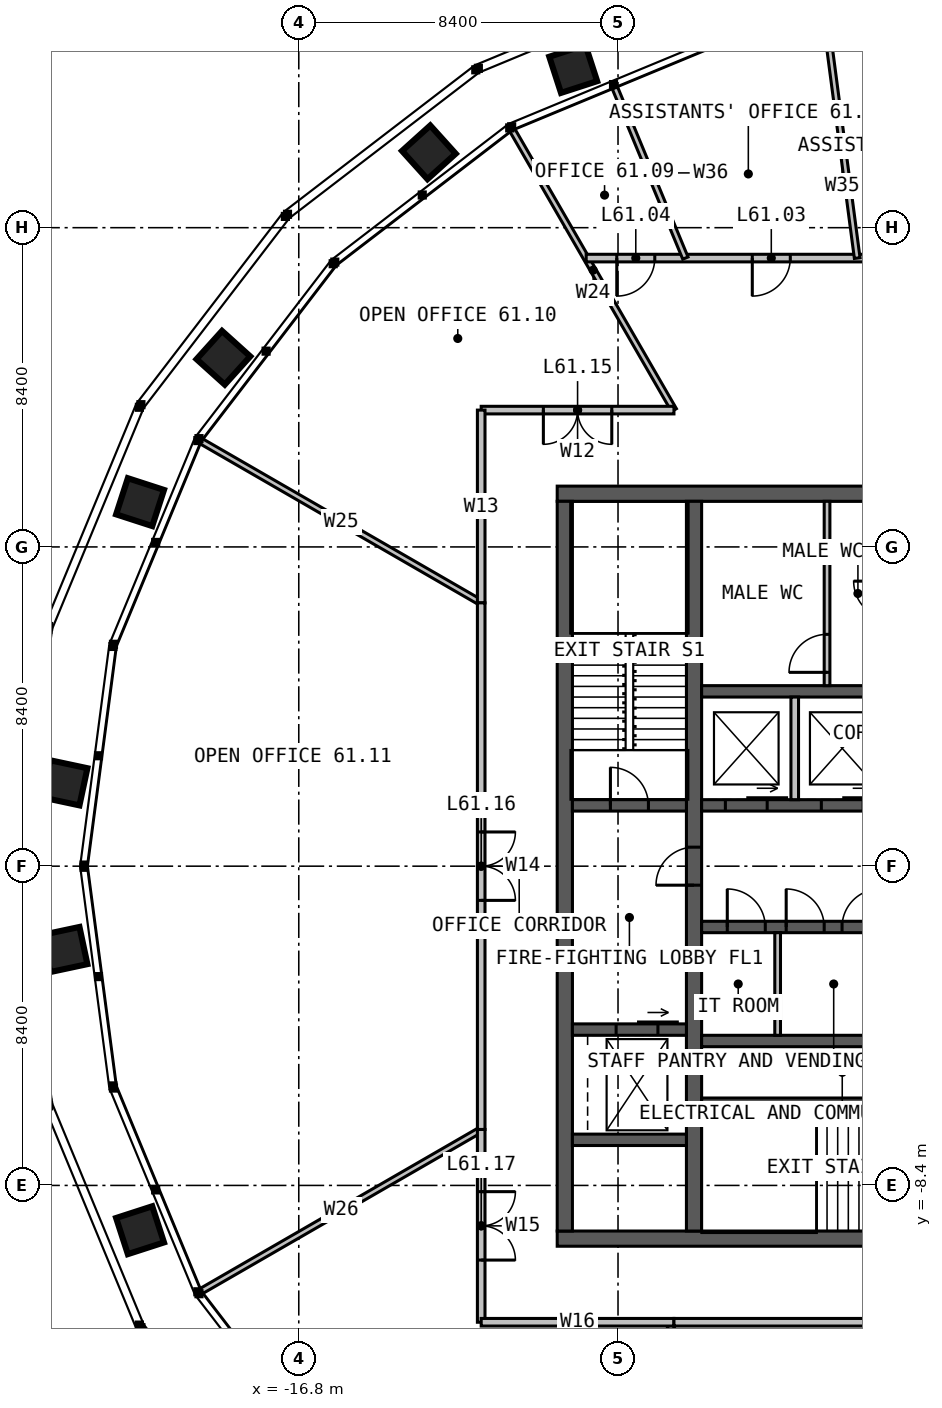
"""IFC4 building model, lengths in metres.
Left out: names, types, materials, properties, quantities, classifications, styles, units other than length and angle.
Written with IfcOpenShell. Run it as: python <this file> out.ifc"""

import sys

from ifc_helpers import new_model, si_unit, direction, frame, frame_2d, origin, place, context, subcontext, project, spatial, rectangle, extrude, element, fill, save


model = new_model("IFC4")
c1 = context("Model", 3, precision=1e-05, world=origin(), true_north=direction((0.0, 1.0)))
c2 = subcontext(c1, "Body", "Model", "MODEL_VIEW")
j1 = project(units=[si_unit("LENGTHUNIT", "METRE"), si_unit("PLANEANGLEUNIT", "RADIAN")], contexts=[c1])
p1 = place(None, origin())
s1 = spatial("IfcSite", under=j1, at=p1, CompositionType="ELEMENT")
p2 = place(p1, origin())
s2 = spatial("IfcBuilding", under=s1, at=p2, CompositionType="ELEMENT")
p3 = place(p2, frame((0.0, 0.0, 252.0)))
s3 = spatial("IfcBuildingStorey", under=s2, at=p3, CompositionType="ELEMENT", Elevation=252.0)
p4 = place(p3, frame((-10.0, 9.8, 0.0), z_axis=(0.0, 0.0, 1.0), x_axis=(1.0, 0.0, 0.0)))
e1 = element("IfcWall", 1, at=p4, inside=s3, PredefinedType="SOLIDWALL", context=c2, shape_type="SweptSolid", body=[
    extrude(rectangle(XDim=20.0, YDim=0.4, at=frame_2d((10.0, 0.0))), origin(), (0.0, 0.0, 1.0), 4.0),
])
p5 = place(p4, frame((9.4, 0.0, 0.0)))
e2 = element("IfcOpeningElement", 2, at=p5, cuts=e1, PredefinedType="OPENING", context=c2, shape_type="SweptSolid", body=[
    extrude(rectangle(XDim=1.2, YDim=2.2, at=frame_2d((0.6, 1.1))), frame((0.0, 0.21, 0.0), z_axis=(0.0, -1.0, 0.0), x_axis=(1.0, 0.0, 0.0)), (0.0, 0.0, 1.0), 0.42),
])
p6 = place(p3, frame((10.0, -9.8, 0.0), z_axis=(0.0, 0.0, 1.0), x_axis=(-1.0, 0.0, 0.0)))
e3 = element("IfcWall", 3, at=p6, inside=s3, PredefinedType="SOLIDWALL", context=c2, shape_type="SweptSolid", body=[
    extrude(rectangle(XDim=20.0, YDim=0.4, at=frame_2d((10.0, 0.0))), origin(), (0.0, 0.0, 1.0), 4.0),
])
p7 = place(p6, frame((6.875, 0.0, 0.0)))
e4 = element("IfcOpeningElement", 4, at=p7, cuts=e3, PredefinedType="OPENING", context=c2, shape_type="SweptSolid", body=[
    extrude(rectangle(XDim=1.2, YDim=2.2, at=frame_2d((0.6, 1.1))), frame((0.0, 0.21, 0.0), z_axis=(0.0, -1.0, 0.0), x_axis=(1.0, 0.0, 0.0)), (0.0, 0.0, 1.0), 0.42),
])
p8 = place(p3, frame((-9.8, 9.6, 0.0), z_axis=(0.0, 0.0, 1.0), x_axis=(0.0, -1.0, 0.0)))
e5 = element("IfcWall", 5, at=p8, inside=s3, PredefinedType="SOLIDWALL", context=c2, shape_type="SweptSolid", body=[
    extrude(rectangle(XDim=19.2, YDim=0.4, at=frame_2d((9.6, 0.0))), origin(), (0.0, 0.0, 1.0), 4.0),
])
p9 = place(p3, frame((-6.4, -9.6, 0.0), z_axis=(0.0, 0.0, 1.0), x_axis=(0.0, 1.0, 0.0)))
e6 = element("IfcWall", 6, at=p9, inside=s3, PredefinedType="SOLIDWALL", context=c2, shape_type="SweptSolid", body=[
    extrude(rectangle(XDim=19.2, YDim=0.4, at=frame_2d((9.6, 0.0))), origin(), (0.0, 0.0, 1.0), 4.0),
])
p10 = place(p9, frame((9.1, 0.0, 0.0)))
e7 = element("IfcOpeningElement", 7, at=p10, cuts=e6, PredefinedType="OPENING", context=c2, shape_type="SweptSolid", body=[
    extrude(rectangle(XDim=1.0, YDim=2.2, at=frame_2d((0.5, 1.1))), frame((0.0, 0.21, 0.0), z_axis=(0.0, -1.0, 0.0), x_axis=(1.0, 0.0, 0.0)), (0.0, 0.0, 1.0), 0.42),
])
p11 = place(p3, frame((-6.2, 1.6, 0.0), z_axis=(0.0, 0.0, 1.0), x_axis=(1.0, 0.0, 0.0)))
e8 = element("IfcWall", 8, at=p11, inside=s3, PredefinedType="SOLIDWALL", context=c2, shape_type="SweptSolid", body=[
    extrude(rectangle(XDim=4.85, YDim=0.3, at=frame_2d((2.425, 0.0))), origin(), (0.0, 0.0, 1.0), 4.0),
])
p12 = place(p11, frame((0.625, 0.0, 0.0)))
e9 = element("IfcOpeningElement", 9, at=p12, cuts=e8, PredefinedType="OPENING", context=c2, shape_type="SweptSolid", body=[
    extrude(rectangle(XDim=1.1, YDim=2.2, at=frame_2d((0.55, 1.1))), frame((0.0, 0.16, 0.0), z_axis=(0.0, -1.0, 0.0), x_axis=(1.0, 0.0, 0.0)), (0.0, 0.0, 1.0), 0.32),
])
p13 = place(p11, frame((3.15, 0.0, 0.0)))
e10 = element("IfcOpeningElement", 10, at=p13, cuts=e8, PredefinedType="OPENING", context=c2, shape_type="SweptSolid", body=[
    extrude(rectangle(XDim=1.1, YDim=2.2, at=frame_2d((0.55, 1.1))), frame((0.0, 0.16, 0.0), z_axis=(0.0, -1.0, 0.0), x_axis=(1.0, 0.0, 0.0)), (0.0, 0.0, 1.0), 0.32),
])
p14 = place(p3, frame((-6.2, 4.6, 0.0), z_axis=(0.0, 0.0, 1.0), x_axis=(1.0, 0.0, 0.0)))
e11 = element("IfcWall", 11, at=p14, inside=s3, PredefinedType="SOLIDWALL", context=c2, shape_type="SweptSolid", body=[
    extrude(rectangle(XDim=4.85, YDim=0.3, at=frame_2d((2.425, 0.0))), origin(), (0.0, 0.0, 1.0), 4.0),
])
p15 = place(p3, frame((-6.2, -1.6, 0.0), z_axis=(0.0, 0.0, 1.0), x_axis=(1.0, 0.0, 0.0)))
e12 = element("IfcWall", 12, at=p15, inside=s3, PredefinedType="SOLIDWALL", context=c2, shape_type="SweptSolid", body=[
    extrude(rectangle(XDim=7.4, YDim=0.3, at=frame_2d((3.7, 0.0))), origin(), (0.0, 0.0, 1.0), 4.0),
])
p16 = place(p15, frame((0.675, 0.0, 0.0)))
e13 = element("IfcOpeningElement", 13, at=p16, cuts=e12, PredefinedType="OPENING", context=c2, shape_type="SweptSolid", body=[
    extrude(rectangle(XDim=1.0, YDim=2.2, at=frame_2d((0.5, 1.1))), frame((0.0, 0.16, 0.0), z_axis=(0.0, -1.0, 0.0), x_axis=(1.0, 0.0, 0.0)), (0.0, 0.0, 1.0), 0.32),
])
p17 = place(p15, frame((2.225, 0.0, 0.0)))
e14 = element("IfcOpeningElement", 14, at=p17, cuts=e12, PredefinedType="OPENING", context=c2, shape_type="SweptSolid", body=[
    extrude(rectangle(XDim=1.0, YDim=2.2, at=frame_2d((0.5, 1.1))), frame((0.0, 0.16, 0.0), z_axis=(0.0, -1.0, 0.0), x_axis=(1.0, 0.0, 0.0)), (0.0, 0.0, 1.0), 0.32),
])
p18 = place(p15, frame((3.695, 0.0, 0.0)))
e15 = element("IfcOpeningElement", 15, at=p18, cuts=e12, PredefinedType="OPENING", context=c2, shape_type="SweptSolid", body=[
    extrude(rectangle(XDim=1.0, YDim=2.2, at=frame_2d((0.5, 1.1))), frame((0.0, 0.16, 0.0), z_axis=(0.0, -1.0, 0.0), x_axis=(1.0, 0.0, 0.0)), (0.0, 0.0, 1.0), 0.32),
])
p19 = place(p3, frame((-6.2, -4.6, 0.0), z_axis=(0.0, 0.0, 1.0), x_axis=(1.0, 0.0, 0.0)))
e16 = element("IfcWall", 16, at=p19, inside=s3, PredefinedType="SOLIDWALL", context=c2, shape_type="SweptSolid", body=[
    extrude(rectangle(XDim=7.4, YDim=0.3, at=frame_2d((3.7, 0.0))), origin(), (0.0, 0.0, 1.0), 4.0),
])
p20 = place(p3, frame((-6.2, -6.2, 0.0), z_axis=(0.0, 0.0, 1.0), x_axis=(1.0, 0.0, 0.0)))
e17 = element("IfcWall", 17, at=p20, inside=s3, PredefinedType="SOLIDWALL", context=c2, shape_type="SweptSolid", body=[
    extrude(rectangle(XDim=7.4, YDim=0.2, at=frame_2d((3.7, 0.0))), origin(), (0.0, 0.0, 1.0), 4.0),
])
p21 = place(p3, frame((-9.6, 1.6, 0.0), z_axis=(0.0, 0.0, 1.0), x_axis=(1.0, 0.0, 0.0)))
e18 = element("IfcWall", 18, at=p21, inside=s3, PredefinedType="SOLIDWALL", context=c2, shape_type="SweptSolid", body=[
    extrude(rectangle(XDim=3.0, YDim=0.3, at=frame_2d((1.5, 0.0))), origin(), (0.0, 0.0, 1.0), 4.0),
])
p22 = place(p21, frame((1.0, 0.0, 0.0)))
e19 = element("IfcOpeningElement", 19, at=p22, cuts=e18, PredefinedType="OPENING", context=c2, shape_type="SweptSolid", body=[
    extrude(rectangle(XDim=1.0, YDim=2.2, at=frame_2d((0.5, 1.1))), frame((0.0, 0.16, 0.0), z_axis=(0.0, -1.0, 0.0), x_axis=(1.0, 0.0, 0.0)), (0.0, 0.0, 1.0), 0.32),
])
p23 = place(p3, frame((-9.6, -4.3, 0.0), z_axis=(0.0, 0.0, 1.0), x_axis=(1.0, 0.0, 0.0)))
e20 = element("IfcWall", 20, at=p23, inside=s3, PredefinedType="SOLIDWALL", context=c2, shape_type="SweptSolid", body=[
    extrude(rectangle(XDim=3.0, YDim=0.3, at=frame_2d((1.5, 0.0))), origin(), (0.0, 0.0, 1.0), 4.0),
])
p24 = place(p23, frame((1.15, 0.0, 0.0)))
e21 = element("IfcOpeningElement", 21, at=p24, cuts=e20, PredefinedType="OPENING", context=c2, shape_type="SweptSolid", body=[
    extrude(rectangle(XDim=1.1, YDim=2.2, at=frame_2d((0.55, 1.1))), frame((0.0, 0.16, 0.0), z_axis=(0.0, -1.0, 0.0), x_axis=(1.0, 0.0, 0.0)), (0.0, 0.0, 1.0), 0.32),
])
p25 = place(p3, frame((-9.6, -7.2, 0.0), z_axis=(0.0, 0.0, 1.0), x_axis=(1.0, 0.0, 0.0)))
e22 = element("IfcWall", 22, at=p25, inside=s3, PredefinedType="SOLIDWALL", context=c2, shape_type="SweptSolid", body=[
    extrude(rectangle(XDim=3.0, YDim=0.3, at=frame_2d((1.5, 0.0))), origin(), (0.0, 0.0, 1.0), 4.0),
])
p26 = place(p3, frame((-3.75, 1.75, 0.0), z_axis=(0.0, 0.0, 1.0), x_axis=(0.0, 1.0, 0.0)))
e23 = element("IfcWall", 23, at=p26, inside=s3, PredefinedType="SOLIDWALL", context=c2, shape_type="SweptSolid", body=[
    extrude(rectangle(XDim=2.7, YDim=0.2, at=frame_2d((1.35, 0.0))), origin(), (0.0, 0.0, 1.0), 3.75),
])
p27 = place(p3, frame((-2.9, 4.75, 0.0), z_axis=(0.0, 0.0, 1.0), x_axis=(0.0, 1.0, 0.0)))
e24 = element("IfcWall", 24, at=p27, inside=s3, PredefinedType="PARTITIONING", context=c2, shape_type="SweptSolid", body=[
    extrude(rectangle(XDim=4.85, YDim=0.15, at=frame_2d((2.425, 0.0))), origin(), (0.0, 0.0, 1.0), 3.75),
])
p28 = place(p27, frame((0.35, 0.0, 0.0)))
e25 = element("IfcOpeningElement", 25, at=p28, cuts=e24, PredefinedType="OPENING", context=c2, shape_type="SweptSolid", body=[
    extrude(rectangle(XDim=1.0, YDim=2.2, at=frame_2d((0.5, 1.1))), frame((0.0, 0.085, 0.0), z_axis=(0.0, -1.0, 0.0), x_axis=(1.0, 0.0, 0.0)), (0.0, 0.0, 1.0), 0.17),
])
p29 = place(p3, frame((-4.2, -1.75, 0.0), z_axis=(0.0, 0.0, 1.0), x_axis=(0.0, -1.0, 0.0)))
e26 = element("IfcWall", 26, at=p29, inside=s3, PredefinedType="PARTITIONING", context=c2, shape_type="SweptSolid", body=[
    extrude(rectangle(XDim=2.7, YDim=0.15, at=frame_2d((1.35, 0.0))), origin(), (0.0, 0.0, 1.0), 3.75),
])
for number, where, z_axis, x_axis in (
    (27, (-6.928, 12.0, 0.0), (0.0, 0.0, 1.0), (-0.5, 0.866, 0.0)),
    (28, (-12.0, 6.928, 0.0), (0.0, 0.0, 1.0), (-0.866, 0.5, 0.0)),
    (29, (-12.0, -6.928, 0.0), (0.0, 0.0, 1.0), (-0.866, -0.5, 0.0)),
    (30, (-6.928, -12.0, 0.0), (0.0, 0.0, 1.0), (-0.5, -0.866, 0.0)),
):
    element("IfcWall", number, at=place(p3, frame(where, z_axis=z_axis, x_axis=x_axis)), inside=s3, PredefinedType="PARTITIONING", context=c2, shape_type="SweptSolid", body=[
        extrude(rectangle(XDim=8.505, YDim=0.15, at=frame_2d((4.252, 0.0))), origin(), (0.0, 0.0, 1.0), 2.79),
    ])
p30 = place(p3, frame((9.238, 16.0, 0.0), z_axis=(0.0, 0.0, 1.0), x_axis=(-1.0, 0.0, 0.0)))
e31 = element("IfcWall", 31, at=p30, inside=s3, PredefinedType="PARTITIONING", context=c2, shape_type="SweptSolid", body=[
    extrude(rectangle(XDim=18.475, YDim=0.2, at=frame_2d((9.238, 0.0))), origin(), (0.0, 0.0, 1.0), 3.8),
])
p31 = place(p30, frame((3.066, 0.0, 0.0)))
e32 = element("IfcOpeningElement", 32, at=p31, cuts=e31, PredefinedType="OPENING", context=c2, shape_type="SweptSolid", body=[
    extrude(rectangle(XDim=1.0, YDim=2.2, at=frame_2d((0.5, 1.1))), frame((0.0, 0.11, 0.0), z_axis=(0.0, -1.0, 0.0), x_axis=(1.0, 0.0, 0.0)), (0.0, 0.0, 1.0), 0.22),
])
p32 = place(p30, frame((8.738, 0.0, 0.0)))
e33 = element("IfcOpeningElement", 33, at=p32, cuts=e31, PredefinedType="OPENING", context=c2, shape_type="SweptSolid", body=[
    extrude(rectangle(XDim=1.0, YDim=2.2, at=frame_2d((0.5, 1.1))), frame((0.0, 0.11, 0.0), z_axis=(0.0, -1.0, 0.0), x_axis=(1.0, 0.0, 0.0)), (0.0, 0.0, 1.0), 0.22),
])
p33 = place(p30, frame((13.104, 0.0, 0.0)))
e34 = element("IfcOpeningElement", 34, at=p33, cuts=e31, PredefinedType="OPENING", context=c2, shape_type="SweptSolid", body=[
    extrude(rectangle(XDim=1.0, YDim=2.2, at=frame_2d((0.5, 1.1))), frame((0.0, 0.11, 0.0), z_axis=(0.0, -1.0, 0.0), x_axis=(1.0, 0.0, 0.0)), (0.0, 0.0, 1.0), 0.22),
])
p34 = place(p30, frame((16.67, 0.0, 0.0)))
e35 = element("IfcOpeningElement", 35, at=p34, cuts=e31, PredefinedType="OPENING", context=c2, shape_type="SweptSolid", body=[
    extrude(rectangle(XDim=1.0, YDim=2.2, at=frame_2d((0.5, 1.1))), frame((0.0, 0.11, 0.0), z_axis=(0.0, -1.0, 0.0), x_axis=(1.0, 0.0, 0.0)), (0.0, 0.0, 1.0), 0.22),
])
p35 = place(p3, frame((-2.106, 16.0, 0.0), z_axis=(0.0, 0.0, 1.0), x_axis=(-0.130533038219, 0.991443960057, 0.0)))
e36 = element("IfcWall", 36, at=p35, inside=s3, PredefinedType="PARTITIONING", context=c2, shape_type="SweptSolid", body=[
    extrude(rectangle(XDim=6.032, YDim=0.15, at=frame_2d((3.016, 0.0))), origin(), (0.0, 0.0, 1.0), 2.79),
])
p36 = place(p3, frame((-6.627, 16.0, 0.0), z_axis=(0.0, 0.0, 1.0), x_axis=(-0.38268510723, 0.923878838758, 0.0)))
e37 = element("IfcWall", 37, at=p36, inside=s3, PredefinedType="PARTITIONING", context=c2, shape_type="SweptSolid", body=[
    extrude(rectangle(XDim=4.852, YDim=0.15, at=frame_2d((2.426, 0.0))), origin(), (0.0, 0.0, 1.0), 2.79),
])
p37 = place(p3, frame((-6.928, 12.0, 0.0), z_axis=(0.0, 0.0, 1.0), x_axis=(-1.0, 0.0, 0.0)))
e38 = element("IfcWall", 38, at=p37, inside=s3, PredefinedType="PARTITIONING", context=c2, shape_type="SweptSolid", body=[
    extrude(rectangle(XDim=5.072, YDim=0.2, at=frame_2d((2.536, 0.0))), origin(), (0.0, 0.0, 1.0), 3.8),
])
p38 = place(p37, frame((1.636, 0.0, 0.0)))
e39 = element("IfcOpeningElement", 39, at=p38, cuts=e38, PredefinedType="OPENING", context=c2, shape_type="SweptSolid", body=[
    extrude(rectangle(XDim=1.8, YDim=2.2, at=frame_2d((0.9, 1.1))), frame((0.0, 0.11, 0.0), z_axis=(0.0, -1.0, 0.0), x_axis=(1.0, 0.0, 0.0)), (0.0, 0.0, 1.0), 0.22),
])
p39 = place(p3, frame((-12.0, 12.0, 0.0), z_axis=(0.0, 0.0, 1.0), x_axis=(0.0, -1.0, 0.0)))
e40 = element("IfcWall", 40, at=p39, inside=s3, PredefinedType="PARTITIONING", context=c2, shape_type="SweptSolid", body=[
    extrude(rectangle(XDim=5.072, YDim=0.2, at=frame_2d((2.536, 0.0))), origin(), (0.0, 0.0, 1.0), 3.8),
])
p40 = place(p3, frame((-12.0, 6.928, 0.0), z_axis=(0.0, 0.0, 1.0), x_axis=(0.0, -1.0, 0.0)))
e41 = element("IfcWall", 41, at=p40, inside=s3, PredefinedType="PARTITIONING", context=c2, shape_type="SweptSolid", body=[
    extrude(rectangle(XDim=13.856, YDim=0.2, at=frame_2d((6.928, 0.0))), origin(), (0.0, 0.0, 1.0), 3.8),
])
p41 = place(p40, frame((6.028, 0.0, 0.0)))
e42 = element("IfcOpeningElement", 42, at=p41, cuts=e41, PredefinedType="OPENING", context=c2, shape_type="SweptSolid", body=[
    extrude(rectangle(XDim=1.8, YDim=2.2, at=frame_2d((0.9, 1.1))), frame((0.0, 0.11, 0.0), z_axis=(0.0, -1.0, 0.0), x_axis=(1.0, 0.0, 0.0)), (0.0, 0.0, 1.0), 0.22),
])
p42 = place(p3, frame((-12.0, -6.928, 0.0), z_axis=(0.0, 0.0, 1.0), x_axis=(0.0, -1.0, 0.0)))
e43 = element("IfcWall", 43, at=p42, inside=s3, PredefinedType="PARTITIONING", context=c2, shape_type="SweptSolid", body=[
    extrude(rectangle(XDim=5.072, YDim=0.2, at=frame_2d((2.536, 0.0))), origin(), (0.0, 0.0, 1.0), 3.8),
])
p43 = place(p42, frame((1.636, 0.0, 0.0)))
e44 = element("IfcOpeningElement", 44, at=p43, cuts=e43, PredefinedType="OPENING", context=c2, shape_type="SweptSolid", body=[
    extrude(rectangle(XDim=1.8, YDim=2.2, at=frame_2d((0.9, 1.1))), frame((0.0, 0.11, 0.0), z_axis=(0.0, -1.0, 0.0), x_axis=(1.0, 0.0, 0.0)), (0.0, 0.0, 1.0), 0.22),
])
p44 = place(p3, frame((-12.0, -12.0, 0.0), z_axis=(0.0, 0.0, 1.0), x_axis=(1.0, 0.0, 0.0)))
e45 = element("IfcWall", 45, at=p44, inside=s3, PredefinedType="PARTITIONING", context=c2, shape_type="SweptSolid", body=[
    extrude(rectangle(XDim=5.072, YDim=0.2, at=frame_2d((2.536, 0.0))), origin(), (0.0, 0.0, 1.0), 3.8),
])
p45 = place(p3, frame((-6.928, -12.0, 0.0), z_axis=(0.0, 0.0, 1.0), x_axis=(1.0, 0.0, 0.0)))
e46 = element("IfcWall", 46, at=p45, inside=s3, PredefinedType="PARTITIONING", context=c2, shape_type="SweptSolid", body=[
    extrude(rectangle(XDim=13.856, YDim=0.2, at=frame_2d((6.928, 0.0))), origin(), (0.0, 0.0, 1.0), 3.8),
])
p46 = place(p45, frame((6.028, 0.0, 0.0)))
e47 = element("IfcOpeningElement", 47, at=p46, cuts=e46, PredefinedType="OPENING", context=c2, shape_type="SweptSolid", body=[
    extrude(rectangle(XDim=1.8, YDim=2.2, at=frame_2d((0.9, 1.1))), frame((0.0, 0.11, 0.0), z_axis=(0.0, -1.0, 0.0), x_axis=(1.0, 0.0, 0.0)), (0.0, 0.0, 1.0), 0.22),
])
p47 = place(p10, origin())
e48 = element("IfcDoor", 48, at=p47, inside=s3, OperationType="SINGLE_SWING_LEFT", PredefinedType="DOOR", context=c2, shape_type="SweptSolid", body=[
    extrude(rectangle(XDim=1.0, YDim=2.2, at=frame_2d((0.5, 1.1))), frame((0.0, 0.025, 0.0), z_axis=(0.0, -1.0, 0.0), x_axis=(1.0, 0.0, 0.0)), (0.0, 0.0, 1.0), 0.05),
])
fill(e7, e48)
p48 = place(p22, origin())
e49 = element("IfcDoor", 49, at=p48, inside=s3, OperationType="SINGLE_SWING_LEFT", PredefinedType="DOOR", context=c2, shape_type="SweptSolid", body=[
    extrude(rectangle(XDim=1.0, YDim=2.2, at=frame_2d((0.5, 1.1))), frame((0.0, 0.025, 0.0), z_axis=(0.0, -1.0, 0.0), x_axis=(1.0, 0.0, 0.0)), (0.0, 0.0, 1.0), 0.05),
])
fill(e19, e49)
p49 = place(p28, origin())
e50 = element("IfcDoor", 50, at=p49, inside=s3, OperationType="SINGLE_SWING_LEFT", PredefinedType="DOOR", context=c2, shape_type="SweptSolid", body=[
    extrude(rectangle(XDim=1.0, YDim=2.2, at=frame_2d((0.5, 1.1))), frame((0.0, 0.025, 0.0), z_axis=(0.0, -1.0, 0.0), x_axis=(1.0, 0.0, 0.0)), (0.0, 0.0, 1.0), 0.05),
])
fill(e25, e50)
p50 = place(p16, origin())
e51 = element("IfcDoor", 51, at=p50, inside=s3, OperationType="SINGLE_SWING_LEFT", PredefinedType="DOOR", context=c2, shape_type="SweptSolid", body=[
    extrude(rectangle(XDim=1.0, YDim=2.2, at=frame_2d((0.5, 1.1))), frame((0.0, 0.025, 0.0), z_axis=(0.0, -1.0, 0.0), x_axis=(1.0, 0.0, 0.0)), (0.0, 0.0, 1.0), 0.05),
])
fill(e13, e51)
p51 = place(p17, origin())
e52 = element("IfcDoor", 52, at=p51, inside=s3, OperationType="SINGLE_SWING_LEFT", PredefinedType="DOOR", context=c2, shape_type="SweptSolid", body=[
    extrude(rectangle(XDim=1.0, YDim=2.2, at=frame_2d((0.5, 1.1))), frame((0.0, 0.025, 0.0), z_axis=(0.0, -1.0, 0.0), x_axis=(1.0, 0.0, 0.0)), (0.0, 0.0, 1.0), 0.05),
])
fill(e14, e52)
p52 = place(p18, origin())
e53 = element("IfcDoor", 53, at=p52, inside=s3, OperationType="SINGLE_SWING_RIGHT", PredefinedType="DOOR", context=c2, shape_type="SweptSolid", body=[
    extrude(rectangle(XDim=1.0, YDim=2.2, at=frame_2d((0.5, 1.1))), frame((0.0, 0.025, 0.0), z_axis=(0.0, -1.0, 0.0), x_axis=(1.0, 0.0, 0.0)), (0.0, 0.0, 1.0), 0.05),
])
fill(e15, e53)
p53 = place(p12, origin())
e54 = element("IfcDoor", 54, at=p53, inside=s3, OperationType="SLIDING_TO_LEFT", PredefinedType="DOOR", context=c2, shape_type="SweptSolid", body=[
    extrude(rectangle(XDim=1.1, YDim=2.2, at=frame_2d((0.55, 1.1))), frame((0.0, 0.025, 0.0), z_axis=(0.0, -1.0, 0.0), x_axis=(1.0, 0.0, 0.0)), (0.0, 0.0, 1.0), 0.05),
])
fill(e9, e54)
p54 = place(p13, origin())
e55 = element("IfcDoor", 55, at=p54, inside=s3, OperationType="SLIDING_TO_LEFT", PredefinedType="DOOR", context=c2, shape_type="SweptSolid", body=[
    extrude(rectangle(XDim=1.1, YDim=2.2, at=frame_2d((0.55, 1.1))), frame((0.0, 0.025, 0.0), z_axis=(0.0, -1.0, 0.0), x_axis=(1.0, 0.0, 0.0)), (0.0, 0.0, 1.0), 0.05),
])
fill(e10, e55)
p55 = place(p24, origin())
e56 = element("IfcDoor", 56, at=p55, inside=s3, OperationType="SLIDING_TO_LEFT", PredefinedType="DOOR", context=c2, shape_type="SweptSolid", body=[
    extrude(rectangle(XDim=1.1, YDim=2.2, at=frame_2d((0.55, 1.1))), frame((0.0, 0.025, 0.0), z_axis=(0.0, -1.0, 0.0), x_axis=(1.0, 0.0, 0.0)), (0.0, 0.0, 1.0), 0.05),
])
fill(e21, e56)
p56 = place(p33, origin())
e57 = element("IfcDoor", 57, at=p56, inside=s3, OperationType="SINGLE_SWING_RIGHT", PredefinedType="DOOR", context=c2, shape_type="SweptSolid", body=[
    extrude(rectangle(XDim=1.0, YDim=2.2, at=frame_2d((0.5, 1.1))), frame((0.0, 0.025, 0.0), z_axis=(0.0, -1.0, 0.0), x_axis=(1.0, 0.0, 0.0)), (0.0, 0.0, 1.0), 0.05),
])
fill(e34, e57)
p57 = place(p34, origin())
e58 = element("IfcDoor", 58, at=p57, inside=s3, OperationType="SINGLE_SWING_RIGHT", PredefinedType="DOOR", context=c2, shape_type="SweptSolid", body=[
    extrude(rectangle(XDim=1.0, YDim=2.2, at=frame_2d((0.5, 1.1))), frame((0.0, 0.025, 0.0), z_axis=(0.0, -1.0, 0.0), x_axis=(1.0, 0.0, 0.0)), (0.0, 0.0, 1.0), 0.05),
])
fill(e35, e58)
p58 = place(p38, origin())
e59 = element("IfcDoor", 59, at=p58, inside=s3, OperationType="DOUBLE_DOOR_SINGLE_SWING", PredefinedType="DOOR", context=c2, shape_type="SweptSolid", body=[
    extrude(rectangle(XDim=1.8, YDim=2.2, at=frame_2d((0.9, 1.1))), frame((0.0, 0.025, 0.0), z_axis=(0.0, -1.0, 0.0), x_axis=(1.0, 0.0, 0.0)), (0.0, 0.0, 1.0), 0.05),
])
fill(e39, e59)
p59 = place(p41, origin())
e60 = element("IfcDoor", 60, at=p59, inside=s3, OperationType="DOUBLE_DOOR_SINGLE_SWING", PredefinedType="DOOR", context=c2, shape_type="SweptSolid", body=[
    extrude(rectangle(XDim=1.8, YDim=2.2, at=frame_2d((0.9, 1.1))), frame((0.0, 0.025, 0.0), z_axis=(0.0, -1.0, 0.0), x_axis=(1.0, 0.0, 0.0)), (0.0, 0.0, 1.0), 0.05),
])
fill(e42, e60)
p60 = place(p43, origin())
e61 = element("IfcDoor", 61, at=p60, inside=s3, OperationType="DOUBLE_DOOR_SINGLE_SWING", PredefinedType="DOOR", context=c2, shape_type="SweptSolid", body=[
    extrude(rectangle(XDim=1.8, YDim=2.2, at=frame_2d((0.9, 1.1))), frame((0.0, 0.025, 0.0), z_axis=(0.0, -1.0, 0.0), x_axis=(1.0, 0.0, 0.0)), (0.0, 0.0, 1.0), 0.05),
])
fill(e44, e61)
save(model, sys.argv[1])
